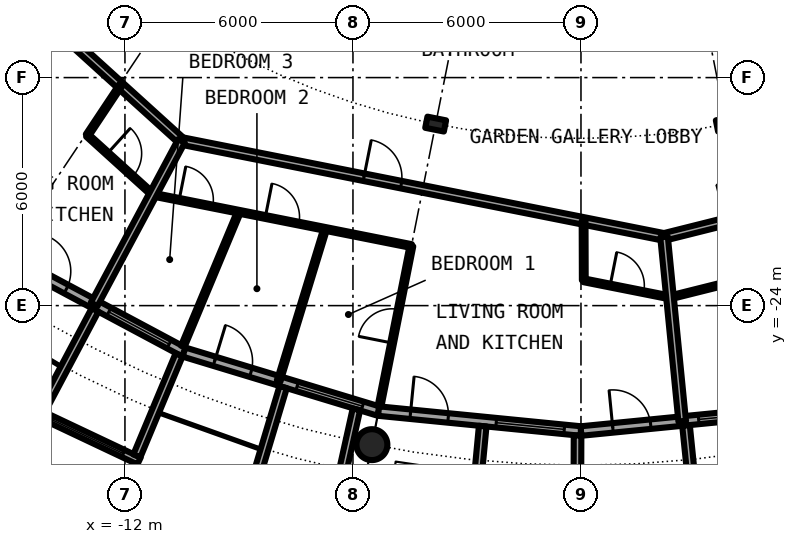
"""IFC4 building model, lengths in metres.
Left out: names, types, materials, properties, quantities, classifications, styles, units other than length and angle.
Written with IfcOpenShell. Run it as: python <this file> out.ifc"""

import sys

from ifc_helpers import new_model, si_unit, direction, frame, frame_2d, origin, origin_2d, place, context, subcontext, project, spatial, rectangle, circle, hollow_circle, i_section, extrude, element, fill, save


model = new_model("IFC4")
c1 = context("Model", 3, precision=1e-05, world=origin(), true_north=direction((0.0, 1.0)))
c2 = subcontext(c1, "Body", "Model", "MODEL_VIEW")
j1 = project(units=[si_unit("LENGTHUNIT", "METRE"), si_unit("PLANEANGLEUNIT", "RADIAN")], contexts=[c1])
p1 = place(None, origin())
s1 = spatial("IfcSite", under=j1, at=p1, CompositionType="ELEMENT")
p2 = place(p1, origin())
s2 = spatial("IfcBuilding", under=s1, at=p2, CompositionType="ELEMENT")
p3 = place(p2, frame((0.0, 0.0, 154.35)))
s3 = spatial("IfcBuildingStorey", under=s2, at=p3, CompositionType="ELEMENT", Elevation=154.35)
p4 = place(p3, frame((-5.501, -27.658, 0.0), z_axis=(0.0, 0.0, 1.0), x_axis=(1.0, 0.0, 0.0)))
e1 = element("IfcColumn", 1, at=p4, inside=s3, PredefinedType="COLUMN", context=c2, shape_type="SweptSolid", body=[
    extrude(hollow_circle(Radius=0.406, WallThickness=0.04, at=origin_2d()), origin(), (0.0, 0.0, 1.0), 3.05),
])
for number, where, z_axis, x_axis in (
    (2, (-3.824, -19.223, 0.0), (0.0, 0.0, 1.0), (-0.195, -0.981, 0.0)),
    (3, (3.824, -19.223, 0.0), (0.0, 0.0, 1.0), (0.195, -0.981, 0.0)),
):
    element("IfcColumn", number, at=place(p3, frame(where, z_axis=z_axis, x_axis=x_axis)), inside=s3, PredefinedType="COLUMN", context=c2, shape_type="SweptSolid", body=[
        extrude(i_section(OverallWidth=0.3, OverallDepth=0.5, WebThickness=0.014, FlangeThickness=0.028, FilletRadius=0.027, at=origin_2d()), origin(), (0.0, 0.0, 1.0), 3.05),
    ])
p5 = place(p3, frame((-15.167, -22.699, 0.0), z_axis=(0.0, 0.0, 1.0), x_axis=(0.881915646801, -0.471407246368, 0.0)))
e4 = element("IfcWall", 4, at=p5, inside=s3, PredefinedType="SOLIDWALL", context=c2, shape_type="SweptSolid", body=[
    extrude(rectangle(XDim=5.352, YDim=0.25, at=frame_2d((2.676, 0.0))), origin(), (0.0, 0.0, 1.0), 2.7),
])
p6 = place(p5, frame((0.841, 0.0, 0.0)))
e5 = element("IfcOpeningElement", 5, at=p6, cuts=e4, PredefinedType="OPENING", context=c2, shape_type="SweptSolid", body=[
    extrude(rectangle(XDim=1.0, YDim=2.2, at=frame_2d((0.5, 1.1))), frame((0.0, 0.135, 0.0), z_axis=(0.0, -1.0, 0.0), x_axis=(1.0, 0.0, 0.0)), (0.0, 0.0, 1.0), 0.27),
])
p7 = place(p5, frame((3.111, 0.0, 0.3)))
e6 = element("IfcOpeningElement", 6, at=p7, cuts=e4, PredefinedType="OPENING", context=c2, shape_type="SweptSolid", body=[
    extrude(rectangle(XDim=1.8, YDim=2.1, at=frame_2d((0.9, 1.05))), frame((0.0, 0.135, 0.0), z_axis=(0.0, -1.0, 0.0), x_axis=(1.0, 0.0, 0.0)), (0.0, 0.0, 1.0), 0.27),
])
p8 = place(p3, frame((-14.335, -26.808, -0.03), z_axis=(0.0, 0.0, 1.0), x_axis=(0.904000060331, -0.427532327342, 0.0)))
e7 = element("IfcWall", 7, at=p8, inside=s3, PredefinedType="SOLIDWALL", context=c2, shape_type="SweptSolid", body=[
    extrude(rectangle(XDim=2.993, YDim=0.2, at=frame_2d((1.497, 0.0))), origin(), (0.0, 0.0, 1.0), 2.73),
])
p9 = place(p8, frame((0.457, 0.0, 0.33)))
e8 = element("IfcOpeningElement", 8, at=p9, cuts=e7, PredefinedType="OPENING", context=c2, shape_type="SweptSolid", body=[
    extrude(circle(Radius=1.04, at=frame_2d((1.04, 1.04))), frame((0.0, 0.11, 0.0), z_axis=(0.0, -1.0, 0.0), x_axis=(1.0, 0.0, 0.0)), (0.0, 0.0, 1.0), 0.22),
])
p10 = place(p3, frame((-12.787, -24.113, -0.03), z_axis=(0.0, 0.0, 1.0), x_axis=(-0.468365282436, -0.883534924159, 0.0)))
e9 = element("IfcWall", 9, at=p10, inside=s3, PredefinedType="SOLIDWALL", context=c2, shape_type="SweptSolid", body=[
    extrude(rectangle(XDim=3.006, YDim=0.2, at=frame_2d((1.503, 0.0))), origin(), (0.0, 0.0, 1.0), 2.73),
])
p11 = place(p3, frame((-10.575, -25.295, -0.03), z_axis=(0.0, 0.0, 1.0), x_axis=(-0.385697364644, -0.922625353492, 0.0)))
e10 = element("IfcWall", 10, at=p11, inside=s3, PredefinedType="SOLIDWALL", context=c2, shape_type="SweptSolid", body=[
    extrude(rectangle(XDim=2.883, YDim=0.2, at=frame_2d((1.442, 0.0))), origin(), (0.0, 0.0, 1.0), 2.73),
])
p12 = place(p3, frame((-10.447, -25.222, 0.0), z_axis=(0.0, 0.0, 1.0), x_axis=(0.956965678721, -0.290201119486, 0.0)))
e11 = element("IfcWall", 11, at=p12, inside=s3, PredefinedType="SOLIDWALL", context=c2, shape_type="SweptSolid", body=[
    extrude(rectangle(XDim=5.351, YDim=0.25, at=frame_2d((2.676, 0.0))), origin(), (0.0, 0.0, 1.0), 2.7),
])
p13 = place(p12, frame((0.841, 0.0, 0.0)))
e12 = element("IfcOpeningElement", 12, at=p13, cuts=e11, PredefinedType="OPENING", context=c2, shape_type="SweptSolid", body=[
    extrude(rectangle(XDim=1.0, YDim=2.2, at=frame_2d((0.5, 1.1))), frame((0.0, 0.135, 0.0), z_axis=(0.0, -1.0, 0.0), x_axis=(1.0, 0.0, 0.0)), (0.0, 0.0, 1.0), 0.27),
])
p14 = place(p12, frame((3.111, 0.0, 0.3)))
e13 = element("IfcOpeningElement", 13, at=p14, cuts=e11, PredefinedType="OPENING", context=c2, shape_type="SweptSolid", body=[
    extrude(rectangle(XDim=1.8, YDim=2.1, at=frame_2d((0.9, 1.05))), frame((0.0, 0.135, 0.0), z_axis=(0.0, -1.0, 0.0), x_axis=(1.0, 0.0, 0.0)), (0.0, 0.0, 1.0), 0.27),
])
p15 = place(p3, frame((-7.837, -26.144, -0.03), z_axis=(0.0, 0.0, 1.0), x_axis=(-0.287064767992, -0.957911174889, 0.0)))
e14 = element("IfcWall", 14, at=p15, inside=s3, PredefinedType="SOLIDWALL", context=c2, shape_type="SweptSolid", body=[
    extrude(rectangle(XDim=3.006, YDim=0.2, at=frame_2d((1.503, 0.0))), origin(), (0.0, 0.0, 1.0), 2.73),
])
p16 = place(p3, frame((-5.909, -26.729, -0.03), z_axis=(0.0, 0.0, 1.0), x_axis=(-0.216409053917, -0.976302781612, 0.0)))
e15 = element("IfcWall", 15, at=p16, inside=s3, PredefinedType="SOLIDWALL", context=c2, shape_type="SweptSolid", body=[
    extrude(rectangle(XDim=2.925, YDim=0.2, at=frame_2d((1.463, 0.0))), origin(), (0.0, 0.0, 1.0), 2.73),
])
p17 = place(p3, frame((-5.326, -26.775, 0.0), z_axis=(0.0, 0.0, 1.0), x_axis=(0.995173996315, -0.098126026407, 0.0)))
e16 = element("IfcWall", 16, at=p17, inside=s3, PredefinedType="SOLIDWALL", context=c2, shape_type="SweptSolid", body=[
    extrude(rectangle(XDim=5.352, YDim=0.25, at=frame_2d((2.676, 0.0))), origin(), (0.0, 0.0, 1.0), 2.7),
])
p18 = place(p17, frame((0.841, 0.0, 0.0)))
e17 = element("IfcOpeningElement", 17, at=p18, cuts=e16, PredefinedType="OPENING", context=c2, shape_type="SweptSolid", body=[
    extrude(rectangle(XDim=1.0, YDim=2.2, at=frame_2d((0.5, 1.1))), frame((0.0, 0.135, 0.0), z_axis=(0.0, -1.0, 0.0), x_axis=(1.0, 0.0, 0.0)), (0.0, 0.0, 1.0), 0.27),
])
p19 = place(p17, frame((3.111, 0.0, 0.3)))
e18 = element("IfcOpeningElement", 18, at=p19, cuts=e16, PredefinedType="OPENING", context=c2, shape_type="SweptSolid", body=[
    extrude(rectangle(XDim=1.8, YDim=2.1, at=frame_2d((0.9, 1.05))), frame((0.0, 0.135, 0.0), z_axis=(0.0, -1.0, 0.0), x_axis=(1.0, 0.0, 0.0)), (0.0, 0.0, 1.0), 0.27),
])
p20 = place(p3, frame((-2.586, -27.171, -0.03), z_axis=(0.0, 0.0, 1.0), x_axis=(-0.094548432284, -0.995520262954, 0.0)))
e19 = element("IfcWall", 19, at=p20, inside=s3, PredefinedType="SOLIDWALL", context=c2, shape_type="SweptSolid", body=[
    extrude(rectangle(XDim=3.006, YDim=0.2, at=frame_2d((1.503, 0.0))), origin(), (0.0, 0.0, 1.0), 2.73),
])
p21 = place(p3, frame((-0.09, -27.417, -0.03), z_axis=(0.0, 0.0, 1.0), x_axis=(-0.00347308367, -0.999993968827, 0.0)))
e20 = element("IfcWall", 20, at=p21, inside=s3, PredefinedType="SOLIDWALL", context=c2, shape_type="SweptSolid", body=[
    extrude(rectangle(XDim=2.882, YDim=0.2, at=frame_2d((1.441, 0.0))), origin(), (0.0, 0.0, 1.0), 2.73),
])
p22 = place(p3, frame((0.0, -27.3, 0.0), z_axis=(0.0, 0.0, 1.0), x_axis=(0.995173996315, 0.098126026407, 0.0)))
e21 = element("IfcWall", 21, at=p22, inside=s3, PredefinedType="SOLIDWALL", context=c2, shape_type="SweptSolid", body=[
    extrude(rectangle(XDim=5.352, YDim=0.25, at=frame_2d((2.676, 0.0))), origin(), (0.0, 0.0, 1.0), 2.7),
])
p23 = place(p22, frame((0.841, 0.0, 0.0)))
e22 = element("IfcOpeningElement", 22, at=p23, cuts=e21, PredefinedType="OPENING", context=c2, shape_type="SweptSolid", body=[
    extrude(rectangle(XDim=1.0, YDim=2.2, at=frame_2d((0.5, 1.1))), frame((0.0, 0.135, 0.0), z_axis=(0.0, -1.0, 0.0), x_axis=(1.0, 0.0, 0.0)), (0.0, 0.0, 1.0), 0.27),
])
p24 = place(p22, frame((3.111, 0.0, 0.3)))
e23 = element("IfcOpeningElement", 23, at=p24, cuts=e21, PredefinedType="OPENING", context=c2, shape_type="SweptSolid", body=[
    extrude(rectangle(XDim=1.8, YDim=2.1, at=frame_2d((0.9, 1.05))), frame((0.0, 0.135, 0.0), z_axis=(0.0, -1.0, 0.0), x_axis=(1.0, 0.0, 0.0)), (0.0, 0.0, 1.0), 0.27),
])
p25 = place(p3, frame((2.764, -27.153, -0.03), z_axis=(0.0, 0.0, 1.0), x_axis=(0.101505487237, -0.994834979311, 0.0)))
e24 = element("IfcWall", 24, at=p25, inside=s3, PredefinedType="SOLIDWALL", context=c2, shape_type="SweptSolid", body=[
    extrude(rectangle(XDim=3.007, YDim=0.2, at=frame_2d((1.503, 0.0))), origin(), (0.0, 0.0, 1.0), 2.73),
])
p26 = place(p3, frame((2.341, -23.785, 0.0), z_axis=(0.0, 0.0, 1.0), x_axis=(0.970124059177, 0.242609376996, 0.0)))
e25 = element("IfcWall", 25, at=p26, inside=s3, PredefinedType="PARTITIONING", context=c2, shape_type="SweptSolid", body=[
    extrude(rectangle(XDim=2.337, YDim=0.1, at=frame_2d((1.168, 0.0))), origin(), (0.0, 0.0, 1.0), 2.7),
])
p27 = place(p3, frame((-12.988, -19.518, 0.0), z_axis=(0.0, 0.0, 1.0), x_axis=(0.741132356378, -0.671358942988, 0.0)))
e26 = element("IfcWall", 26, at=p27, inside=s3, PredefinedType="PARTITIONING", context=c2, shape_type="SweptSolid", body=[
    extrude(rectangle(XDim=2.323, YDim=0.1, at=frame_2d((1.162, 0.0))), origin(), (0.0, 0.0, 1.0), 2.7),
])
p28 = place(p27, frame((0.712, 0.0, 0.0)))
e27 = element("IfcOpeningElement", 27, at=p28, cuts=e26, PredefinedType="OPENING", context=c2, shape_type="SweptSolid", body=[
    extrude(rectangle(XDim=0.9, YDim=2.3, at=frame_2d((0.45, 1.15))), frame((0.0, 0.06, 0.0), z_axis=(0.0, -1.0, 0.0), x_axis=(1.0, 0.0, 0.0)), (0.0, 0.0, 1.0), 0.12),
])
p29 = place(p3, frame((-11.264, -21.08, 0.0), z_axis=(0.0, 0.0, 1.0), x_axis=(0.980795304313, -0.195039921651, 0.0)))
e28 = element("IfcWall", 28, at=p29, inside=s3, PredefinedType="PARTITIONING", context=c2, shape_type="SweptSolid", body=[
    extrude(rectangle(XDim=6.937, YDim=0.1, at=frame_2d((3.469, 0.0))), origin(), (0.0, 0.0, 1.0), 2.7),
])
p30 = place(p29, frame((3.016, 0.0, 0.0)))
e29 = element("IfcOpeningElement", 29, at=p30, cuts=e28, PredefinedType="OPENING", context=c2, shape_type="SweptSolid", body=[
    extrude(rectangle(XDim=0.9, YDim=2.3, at=frame_2d((0.45, 1.15))), frame((0.0, 0.06, 0.0), z_axis=(0.0, -1.0, 0.0), x_axis=(1.0, 0.0, 0.0)), (0.0, 0.0, 1.0), 0.12),
])
p31 = place(p29, frame((0.704, 0.0, 0.0)))
e30 = element("IfcOpeningElement", 30, at=p31, cuts=e28, PredefinedType="OPENING", context=c2, shape_type="SweptSolid", body=[
    extrude(rectangle(XDim=0.9, YDim=2.3, at=frame_2d((0.45, 1.15))), frame((0.0, 0.06, 0.0), z_axis=(0.0, -1.0, 0.0), x_axis=(1.0, 0.0, 0.0)), (0.0, 0.0, 1.0), 0.12),
])
p32 = place(p3, frame((0.074, -23.334, 0.0), z_axis=(0.0, 0.0, 1.0), x_axis=(0.98081942231, -0.194918600496, 0.0)))
e31 = element("IfcWall", 31, at=p32, inside=s3, PredefinedType="PARTITIONING", context=c2, shape_type="SweptSolid", body=[
    extrude(rectangle(XDim=2.313, YDim=0.1, at=frame_2d((1.157, 0.0))), origin(), (0.0, 0.0, 1.0), 2.7),
])
p33 = place(p32, frame((0.707, 0.0, 0.0)))
e32 = element("IfcOpeningElement", 32, at=p33, cuts=e31, PredefinedType="OPENING", context=c2, shape_type="SweptSolid", body=[
    extrude(rectangle(XDim=0.9, YDim=2.3, at=frame_2d((0.45, 1.15))), frame((0.0, 0.06, 0.0), z_axis=(0.0, -1.0, 0.0), x_axis=(1.0, 0.0, 0.0)), (0.0, 0.0, 1.0), 0.12),
])
p34 = place(p3, frame((2.186, -22.193, 0.0), z_axis=(0.0, 0.0, 1.0), x_axis=(0.97003047456, 0.242983288366, 0.0)))
e33 = element("IfcWall", 33, at=p34, inside=s3, PredefinedType="PARTITIONING", context=c2, shape_type="SweptSolid", body=[
    extrude(rectangle(XDim=6.544, YDim=0.2, at=frame_2d((3.272, 0.0))), origin(), (0.0, 0.0, 1.0), 2.7),
])
p35 = place(p34, frame((1.681, 0.0, 0.0)))
e34 = element("IfcOpeningElement", 34, at=p35, cuts=e33, PredefinedType="OPENING", context=c2, shape_type="SweptSolid", body=[
    extrude(rectangle(XDim=1.0, YDim=2.3, at=frame_2d((0.5, 1.15))), frame((0.0, 0.11, 0.0), z_axis=(0.0, -1.0, 0.0), x_axis=(1.0, 0.0, 0.0)), (0.0, 0.0, 1.0), 0.22),
])
p36 = place(p3, frame((-18.542, -12.389, 0.0), z_axis=(0.0, 0.0, 1.0), x_axis=(0.740979597636, -0.671527539188, 0.0)))
e35 = element("IfcWall", 35, at=p36, inside=s3, PredefinedType="PARTITIONING", context=c2, shape_type="SweptSolid", body=[
    extrude(rectangle(XDim=10.841, YDim=0.2, at=frame_2d((5.42, 0.0))), origin(), (0.0, 0.0, 1.0), 2.7),
])
p37 = place(p36, frame((3.835, 0.0, 0.0)))
e36 = element("IfcOpeningElement", 36, at=p37, cuts=e35, PredefinedType="OPENING", context=c2, shape_type="SweptSolid", body=[
    extrude(rectangle(XDim=1.0, YDim=2.3, at=frame_2d((0.5, 1.15))), frame((0.0, 0.11, 0.0), z_axis=(0.0, -1.0, 0.0), x_axis=(1.0, 0.0, 0.0)), (0.0, 0.0, 1.0), 0.22),
])
p38 = place(p3, frame((-10.512, -19.667, 0.0), z_axis=(0.0, 0.0, 1.0), x_axis=(0.980780341017, -0.195115152343, 0.0)))
e37 = element("IfcWall", 37, at=p38, inside=s3, PredefinedType="PARTITIONING", context=c2, shape_type="SweptSolid", body=[
    extrude(rectangle(XDim=12.947, YDim=0.2, at=frame_2d((6.473, 0.0))), origin(), (0.0, 0.0, 1.0), 2.7),
])
p39 = place(p38, frame((4.894, 0.0, 0.0)))
e38 = element("IfcOpeningElement", 38, at=p39, cuts=e37, PredefinedType="OPENING", context=c2, shape_type="SweptSolid", body=[
    extrude(rectangle(XDim=1.0, YDim=2.3, at=frame_2d((0.5, 1.15))), frame((0.0, 0.11, 0.0), z_axis=(0.0, -1.0, 0.0), x_axis=(1.0, 0.0, 0.0)), (0.0, 0.0, 1.0), 0.22),
])
p40 = place(p3, frame((-12.988, -19.518, 0.0), z_axis=(0.0, 0.0, 1.0), x_axis=(0.554125989098, 0.832432813028, 0.0)))
e39 = element("IfcWall", 39, at=p40, inside=s3, PredefinedType="PARTITIONING", context=c2, shape_type="SweptSolid", body=[
    extrude(rectangle(XDim=1.57, YDim=0.1, at=frame_2d((0.785, 0.0))), origin(), (0.0, 0.0, 1.0), 2.7),
])
p41 = place(p3, frame((-12.81, -23.966, 0.0), z_axis=(0.0, 0.0, 1.0), x_axis=(0.471427642527, 0.881904744211, 0.0)))
e40 = element("IfcWall", 40, at=p41, inside=s3, PredefinedType="PARTITIONING", context=c2, shape_type="SweptSolid", body=[
    extrude(rectangle(XDim=4.875, YDim=0.2, at=frame_2d((2.438, 0.0))), origin(), (0.0, 0.0, 1.0), 2.7),
])
p42 = place(p3, frame((-10.479, -25.073, 0.0), z_axis=(0.0, 0.0, 1.0), x_axis=(0.385572005139, 0.922677749192, 0.0)))
e41 = element("IfcWall", 41, at=p42, inside=s3, PredefinedType="PARTITIONING", context=c2, shape_type="SweptSolid", body=[
    extrude(rectangle(XDim=3.841, YDim=0.1, at=frame_2d((1.92, 0.0))), origin(), (0.0, 0.0, 1.0), 2.7),
])
p43 = place(p3, frame((-7.956, -25.984, 0.0), z_axis=(0.0, 0.0, 1.0), x_axis=(0.292799128207, 0.956173975028, 0.0)))
e42 = element("IfcWall", 42, at=p43, inside=s3, PredefinedType="PARTITIONING", context=c2, shape_type="SweptSolid", body=[
    extrude(rectangle(XDim=4.188, YDim=0.1, at=frame_2d((2.094, 0.0))), origin(), (0.0, 0.0, 1.0), 2.7),
])
p44 = place(p3, frame((-5.302, -26.653, 0.0), z_axis=(0.0, 0.0, 1.0), x_axis=(0.195145394338, 0.98077432423, 0.0)))
e43 = element("IfcWall", 43, at=p44, inside=s3, PredefinedType="PARTITIONING", context=c2, shape_type="SweptSolid", body=[
    extrude(rectangle(XDim=4.305, YDim=0.1, at=frame_2d((2.152, 0.0))), origin(), (0.0, 0.0, 1.0), 2.7),
])
p45 = place(p44, frame((1.702, 0.0, 0.0)))
e44 = element("IfcOpeningElement", 44, at=p45, cuts=e43, PredefinedType="OPENING", context=c2, shape_type="SweptSolid", body=[
    extrude(rectangle(XDim=0.9, YDim=2.3, at=frame_2d((0.45, 1.15))), frame((0.0, 0.06, 0.0), z_axis=(0.0, -1.0, 0.0), x_axis=(1.0, 0.0, 0.0)), (0.0, 0.0, 1.0), 0.12),
])
p46 = place(p3, frame((0.074, -23.334, 0.0), z_axis=(0.0, 0.0, 1.0), x_axis=(-0.003125961595, 0.99999511417, 0.0)))
e45 = element("IfcWall", 45, at=p46, inside=s3, PredefinedType="PARTITIONING", context=c2, shape_type="SweptSolid", body=[
    extrude(rectangle(XDim=1.562, YDim=0.1, at=frame_2d((0.781, 0.0))), origin(), (0.0, 0.0, 1.0), 2.7),
])
p47 = place(p3, frame((2.186, -22.193, 0.0), z_axis=(0.0, 0.0, 1.0), x_axis=(0.098070432075, -0.995179476453, 0.0)))
e46 = element("IfcWall", 46, at=p47, inside=s3, PredefinedType="PARTITIONING", context=c2, shape_type="SweptSolid", body=[
    extrude(rectangle(XDim=4.874, YDim=0.2, at=frame_2d((2.437, 0.0))), origin(), (0.0, 0.0, 1.0), 2.7),
])
p48 = place(p6, origin())
e47 = element("IfcDoor", 47, at=p48, inside=s3, OperationType="SINGLE_SWING_LEFT", PredefinedType="DOOR", context=c2, shape_type="SweptSolid", body=[
    extrude(rectangle(XDim=1.0, YDim=2.2, at=frame_2d((0.5, 1.1))), frame((0.0, 0.025, 0.0), z_axis=(0.0, -1.0, 0.0), x_axis=(1.0, 0.0, 0.0)), (0.0, 0.0, 1.0), 0.05),
])
fill(e5, e47)
p49 = place(p7, origin())
e48 = element("IfcWindow", 48, at=p49, inside=s3, PartitioningType="SINGLE_PANEL", PredefinedType="WINDOW", context=c2, shape_type="SweptSolid", body=[
    extrude(rectangle(XDim=1.8, YDim=2.1, at=frame_2d((0.9, 1.05))), frame((0.0, 0.03, 0.0), z_axis=(0.0, -1.0, 0.0), x_axis=(1.0, 0.0, 0.0)), (0.0, 0.0, 1.0), 0.06),
])
fill(e6, e48)
p50 = place(p9, origin())
e49 = element("IfcWindow", 49, at=p50, inside=s3, PartitioningType="SINGLE_PANEL", PredefinedType="WINDOW", context=c2, shape_type="SweptSolid", body=[
    extrude(circle(Radius=1.04, at=frame_2d((1.04, 1.04))), frame((0.0, 0.03, 0.0), z_axis=(0.0, -1.0, 0.0), x_axis=(1.0, 0.0, 0.0)), (0.0, 0.0, 1.0), 0.06),
])
fill(e8, e49)
p51 = place(p13, origin())
e50 = element("IfcDoor", 50, at=p51, inside=s3, OperationType="SINGLE_SWING_LEFT", PredefinedType="DOOR", context=c2, shape_type="SweptSolid", body=[
    extrude(rectangle(XDim=1.0, YDim=2.2, at=frame_2d((0.5, 1.1))), frame((0.0, 0.025, 0.0), z_axis=(0.0, -1.0, 0.0), x_axis=(1.0, 0.0, 0.0)), (0.0, 0.0, 1.0), 0.05),
])
fill(e12, e50)
p52 = place(p14, origin())
e51 = element("IfcWindow", 51, at=p52, inside=s3, PartitioningType="SINGLE_PANEL", PredefinedType="WINDOW", context=c2, shape_type="SweptSolid", body=[
    extrude(rectangle(XDim=1.8, YDim=2.1, at=frame_2d((0.9, 1.05))), frame((0.0, 0.03, 0.0), z_axis=(0.0, -1.0, 0.0), x_axis=(1.0, 0.0, 0.0)), (0.0, 0.0, 1.0), 0.06),
])
fill(e13, e51)
p53 = place(p18, origin())
e52 = element("IfcDoor", 52, at=p53, inside=s3, OperationType="SINGLE_SWING_LEFT", PredefinedType="DOOR", context=c2, shape_type="SweptSolid", body=[
    extrude(rectangle(XDim=1.0, YDim=2.2, at=frame_2d((0.5, 1.1))), frame((0.0, 0.025, 0.0), z_axis=(0.0, -1.0, 0.0), x_axis=(1.0, 0.0, 0.0)), (0.0, 0.0, 1.0), 0.05),
])
fill(e17, e52)
p54 = place(p19, origin())
e53 = element("IfcWindow", 53, at=p54, inside=s3, PartitioningType="SINGLE_PANEL", PredefinedType="WINDOW", context=c2, shape_type="SweptSolid", body=[
    extrude(rectangle(XDim=1.8, YDim=2.1, at=frame_2d((0.9, 1.05))), frame((0.0, 0.03, 0.0), z_axis=(0.0, -1.0, 0.0), x_axis=(1.0, 0.0, 0.0)), (0.0, 0.0, 1.0), 0.06),
])
fill(e18, e53)
p55 = place(p23, origin())
e54 = element("IfcDoor", 54, at=p55, inside=s3, OperationType="SINGLE_SWING_LEFT", PredefinedType="DOOR", context=c2, shape_type="SweptSolid", body=[
    extrude(rectangle(XDim=1.0, YDim=2.2, at=frame_2d((0.5, 1.1))), frame((0.0, 0.025, 0.0), z_axis=(0.0, -1.0, 0.0), x_axis=(1.0, 0.0, 0.0)), (0.0, 0.0, 1.0), 0.05),
])
fill(e22, e54)
p56 = place(p24, origin())
e55 = element("IfcWindow", 55, at=p56, inside=s3, PartitioningType="SINGLE_PANEL", PredefinedType="WINDOW", context=c2, shape_type="SweptSolid", body=[
    extrude(rectangle(XDim=1.8, YDim=2.1, at=frame_2d((0.9, 1.05))), frame((0.0, 0.03, 0.0), z_axis=(0.0, -1.0, 0.0), x_axis=(1.0, 0.0, 0.0)), (0.0, 0.0, 1.0), 0.06),
])
fill(e23, e55)
p57 = place(p28, origin())
e56 = element("IfcDoor", 56, at=p57, inside=s3, OperationType="SINGLE_SWING_RIGHT", PredefinedType="DOOR", context=c2, shape_type="SweptSolid", body=[
    extrude(rectangle(XDim=0.9, YDim=2.3, at=frame_2d((0.45, 1.15))), frame((0.0, 0.025, 0.0), z_axis=(0.0, -1.0, 0.0), x_axis=(1.0, 0.0, 0.0)), (0.0, 0.0, 1.0), 0.05),
])
fill(e27, e56)
p58 = place(p39, origin())
e57 = element("IfcDoor", 57, at=p58, inside=s3, OperationType="SINGLE_SWING_LEFT", PredefinedType="DOOR", context=c2, shape_type="SweptSolid", body=[
    extrude(rectangle(XDim=1.0, YDim=2.3, at=frame_2d((0.5, 1.15))), frame((0.0, 0.025, 0.0), z_axis=(0.0, -1.0, 0.0), x_axis=(1.0, 0.0, 0.0)), (0.0, 0.0, 1.0), 0.05),
])
fill(e38, e57)
p59 = place(p33, origin())
e58 = element("IfcDoor", 58, at=p59, inside=s3, OperationType="SINGLE_SWING_RIGHT", PredefinedType="DOOR", context=c2, shape_type="SweptSolid", body=[
    extrude(rectangle(XDim=0.9, YDim=2.3, at=frame_2d((0.45, 1.15))), frame((0.0, 0.025, 0.0), z_axis=(0.0, -1.0, 0.0), x_axis=(1.0, 0.0, 0.0)), (0.0, 0.0, 1.0), 0.05),
])
fill(e32, e58)
p60 = place(p45, origin())
e59 = element("IfcDoor", 59, at=p60, inside=s3, OperationType="SINGLE_SWING_LEFT", PredefinedType="DOOR", context=c2, shape_type="SweptSolid", body=[
    extrude(rectangle(XDim=0.9, YDim=2.3, at=frame_2d((0.45, 1.15))), frame((0.0, 0.025, 0.0), z_axis=(0.0, -1.0, 0.0), x_axis=(1.0, 0.0, 0.0)), (0.0, 0.0, 1.0), 0.05),
])
fill(e44, e59)
p61 = place(p30, origin())
e60 = element("IfcDoor", 60, at=p61, inside=s3, OperationType="SINGLE_SWING_LEFT", PredefinedType="DOOR", context=c2, shape_type="SweptSolid", body=[
    extrude(rectangle(XDim=0.9, YDim=2.3, at=frame_2d((0.45, 1.15))), frame((0.0, 0.025, 0.0), z_axis=(0.0, -1.0, 0.0), x_axis=(1.0, 0.0, 0.0)), (0.0, 0.0, 1.0), 0.05),
])
fill(e29, e60)
p62 = place(p31, origin())
e61 = element("IfcDoor", 61, at=p62, inside=s3, OperationType="SINGLE_SWING_LEFT", PredefinedType="DOOR", context=c2, shape_type="SweptSolid", body=[
    extrude(rectangle(XDim=0.9, YDim=2.3, at=frame_2d((0.45, 1.15))), frame((0.0, 0.025, 0.0), z_axis=(0.0, -1.0, 0.0), x_axis=(1.0, 0.0, 0.0)), (0.0, 0.0, 1.0), 0.05),
])
fill(e30, e61)
save(model, sys.argv[1])
